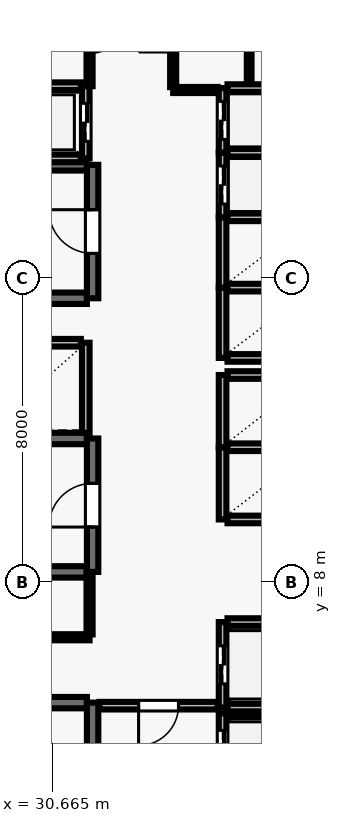
"""IFC4 building model, lengths in metres.
Left out: names, types, materials, properties, quantities, classifications, styles, units other than length and angle.
Written with IfcOpenShell. Run it as: python <this file> out.ifc"""

import sys

from ifc_helpers import new_model, si_unit, direction, frame, frame_2d, origin, place, context, subcontext, project, spatial, rectangle, extrude, element, fill, save


model = new_model("IFC4")
c1 = context("Model", 3, precision=1e-05, world=origin(), true_north=direction((0.0, 1.0)))
c2 = subcontext(c1, "Body", "Model", "MODEL_VIEW")
j1 = project(units=[si_unit("LENGTHUNIT", "METRE"), si_unit("PLANEANGLEUNIT", "RADIAN")], contexts=[c1])
p1 = place(None, origin())
s1 = spatial("IfcSite", under=j1, at=p1, CompositionType="ELEMENT")
p2 = place(p1, origin())
s2 = spatial("IfcBuilding", under=s1, at=p2, CompositionType="ELEMENT")
p3 = place(p2, frame((0.0, 0.0, 138.5)))
s3 = spatial("IfcBuildingStorey", under=s2, at=p3, CompositionType="ELEMENT", Elevation=138.5)
p4 = place(p3, frame((31.58, 4.83, 0.0), z_axis=(0.0, 0.0, 1.0), x_axis=(-1.0, 0.0, 0.0)))
e1 = element("IfcWall", 1, at=p4, inside=s3, PredefinedType="SHEAR", context=c2, shape_type="SweptSolid", body=[
    extrude(rectangle(XDim=8.36, YDim=0.3, at=frame_2d((4.18, 0.0))), origin(), (0.0, 0.0, 1.0), 3.69),
])
p5 = place(p3, frame((31.73, 0.96, 0.0), z_axis=(0.0, 0.0, 1.0), x_axis=(0.0, 1.0, 0.0)))
e2 = element("IfcWall", 2, at=p5, inside=s3, PredefinedType="SHEAR", context=c2, shape_type="SweptSolid", body=[
    extrude(rectangle(XDim=3.87, YDim=0.3, at=frame_2d((1.935, 0.0))), origin(), (0.0, 0.0, 1.0), 3.69),
])
p6 = place(p5, frame((1.54, 0.0, 0.0)))
e3 = element("IfcOpeningElement", 3, at=p6, cuts=e2, PredefinedType="OPENING", context=c2, shape_type="SweptSolid", body=[
    extrude(rectangle(XDim=1.15, YDim=2.15, at=frame_2d((0.575, 1.075))), frame((0.0, 0.16, 0.0), z_axis=(0.0, -1.0, 0.0), x_axis=(1.0, 0.0, 0.0)), (0.0, 0.0, 1.0), 0.32),
])
for number, where, z_axis, x_axis in (
    (4, (31.58, 18.98, 0.0), (0.0, 0.0, 1.0), (-1.0, 0.0, 0.0)),
    (5, (23.22, 15.47, 0.0), (0.0, 0.0, 1.0), (1.0, 0.0, 0.0)),
):
    element("IfcWall", number, at=place(p3, frame(where, z_axis=z_axis, x_axis=x_axis)), inside=s3, PredefinedType="SHEAR", context=c2, shape_type="SweptSolid", body=[
        extrude(rectangle(XDim=8.36, YDim=0.3, at=frame_2d((4.18, 0.0))), origin(), (0.0, 0.0, 1.0), 3.69),
    ])
p7 = place(p3, frame((31.73, 15.47, 0.0), z_axis=(0.0, 0.0, 1.0), x_axis=(0.0, 1.0, 0.0)))
e6 = element("IfcWall", 6, at=p7, inside=s3, PredefinedType="SHEAR", context=c2, shape_type="SweptSolid", body=[
    extrude(rectangle(XDim=3.51, YDim=0.3, at=frame_2d((1.755, 0.0))), origin(), (0.0, 0.0, 1.0), 3.69),
])
p8 = place(p7, frame((1.18, 0.0, 0.0)))
e7 = element("IfcOpeningElement", 7, at=p8, cuts=e6, PredefinedType="OPENING", context=c2, shape_type="SweptSolid", body=[
    extrude(rectangle(XDim=1.15, YDim=2.15, at=frame_2d((0.575, 1.075))), frame((0.0, 0.16, 0.0), z_axis=(0.0, -1.0, 0.0), x_axis=(1.0, 0.0, 0.0)), (0.0, 0.0, 1.0), 0.32),
])
for number, where, z_axis, x_axis in (
    (8, (31.58, 11.78, 0.0), (0.0, 0.0, 1.0), (-1.0, 0.0, 0.0)),
    (9, (23.22, 8.27, 0.0), (0.0, 0.0, 1.0), (1.0, 0.0, 0.0)),
):
    element("IfcWall", number, at=place(p3, frame(where, z_axis=z_axis, x_axis=x_axis)), inside=s3, PredefinedType="SHEAR", context=c2, shape_type="SweptSolid", body=[
        extrude(rectangle(XDim=8.36, YDim=0.3, at=frame_2d((4.18, 0.0))), origin(), (0.0, 0.0, 1.0), 3.69),
    ])
p9 = place(p3, frame((31.73, 8.27, 0.0), z_axis=(0.0, 0.0, 1.0), x_axis=(0.0, 1.0, 0.0)))
e10 = element("IfcWall", 10, at=p9, inside=s3, PredefinedType="SHEAR", context=c2, shape_type="SweptSolid", body=[
    extrude(rectangle(XDim=3.51, YDim=0.3, at=frame_2d((1.755, 0.0))), origin(), (0.0, 0.0, 1.0), 3.69),
])
p10 = place(p9, frame((1.18, 0.0, 0.0)))
e11 = element("IfcOpeningElement", 11, at=p10, cuts=e10, PredefinedType="OPENING", context=c2, shape_type="SweptSolid", body=[
    extrude(rectangle(XDim=1.15, YDim=2.15, at=frame_2d((0.575, 1.075))), frame((0.0, 0.16, 0.0), z_axis=(0.0, -1.0, 0.0), x_axis=(1.0, 0.0, 0.0)), (0.0, 0.0, 1.0), 0.32),
])
p11 = place(p3, frame((35.15, 4.55, 0.0), z_axis=(0.0, 0.0, 1.0), x_axis=(0.0, -1.0, 0.0)))
e12 = element("IfcWall", 12, at=p11, inside=s3, PredefinedType="SOLIDWALL", context=c2, shape_type="SweptSolid", body=[
    extrude(rectangle(XDim=2.1, YDim=0.2, at=frame_2d((1.05, 0.0))), origin(), (0.0, 0.0, 1.0), 3.69),
])
p12 = place(p11, frame((0.45, 0.0, 0.0)))
e13 = element("IfcOpeningElement", 13, at=p12, cuts=e12, PredefinedType="OPENING", context=c2, shape_type="SweptSolid", body=[
    extrude(rectangle(XDim=1.2, YDim=2.15, at=frame_2d((0.6, 1.075))), frame((0.0, 0.11, 0.0), z_axis=(0.0, -1.0, 0.0), x_axis=(1.0, 0.0, 0.0)), (0.0, 0.0, 1.0), 0.22),
])
p13 = place(p3, frame((37.42, 4.55, 0.0), z_axis=(0.0, 0.0, 1.0), x_axis=(-1.0, 0.0, 0.0)))
e14 = element("IfcWall", 14, at=p13, inside=s3, PredefinedType="SOLIDWALL", context=c2, shape_type="SweptSolid", body=[
    extrude(rectangle(XDim=2.14, YDim=0.2, at=frame_2d((1.07, 0.0))), origin(), (0.0, 0.0, 1.0), 3.69),
])
p14 = place(p3, frame((35.15, 6.95, 0.0), z_axis=(0.0, 0.0, 1.0), x_axis=(0.0, -1.0, 0.0)))
e15 = element("IfcWall", 15, at=p14, inside=s3, PredefinedType="SOLIDWALL", context=c2, shape_type="SweptSolid", body=[
    extrude(rectangle(XDim=2.25, YDim=0.2, at=frame_2d((1.125, 0.0))), origin(), (0.0, 0.0, 1.0), 3.69),
])
p15 = place(p14, frame((0.625, 0.0, 0.0)))
e16 = element("IfcOpeningElement", 16, at=p15, cuts=e15, PredefinedType="OPENING", context=c2, shape_type="SweptSolid", body=[
    extrude(rectangle(XDim=1.0, YDim=2.1, at=frame_2d((0.5, 1.05))), frame((0.0, 0.11, 0.0), z_axis=(0.0, -1.0, 0.0), x_axis=(1.0, 0.0, 0.0)), (0.0, 0.0, 1.0), 0.22),
])
for number, where, z_axis, x_axis in (
    (17, (35.28, 4.7, 0.0), (0.0, 0.0, 1.0), (1.0, 0.0, 0.0)),
    (18, (37.42, 6.95, 0.0), (0.0, 0.0, 1.0), (-1.0, 0.0, 0.0)),
):
    element("IfcWall", number, at=place(p3, frame(where, z_axis=z_axis, x_axis=x_axis)), inside=s3, PredefinedType="SOLIDWALL", context=c2, shape_type="SweptSolid", body=[
        extrude(rectangle(XDim=2.14, YDim=0.2, at=frame_2d((1.07, 0.0))), origin(), (0.0, 0.0, 1.0), 3.69),
    ])
p16 = place(p3, frame((35.15, 11.55, 0.0), z_axis=(0.0, 0.0, 1.0), x_axis=(0.0, -1.0, 0.0)))
e19 = element("IfcWall", 19, at=p16, inside=s3, PredefinedType="SOLIDWALL", context=c2, shape_type="SweptSolid", body=[
    extrude(rectangle(XDim=1.9, YDim=0.2, at=frame_2d((0.95, 0.0))), origin(), (0.0, 0.0, 1.0), 3.69),
])
for number, where, z_axis, x_axis in (
    (20, (35.28, 9.65, 0.0), (0.0, 0.0, 1.0), (1.0, 0.0, 0.0)),
    (21, (37.42, 11.55, 0.0), (0.0, 0.0, 1.0), (-1.0, 0.0, 0.0)),
):
    element("IfcWall", number, at=place(p3, frame(where, z_axis=z_axis, x_axis=x_axis)), inside=s3, PredefinedType="SOLIDWALL", context=c2, shape_type="SweptSolid", body=[
        extrude(rectangle(XDim=2.14, YDim=0.2, at=frame_2d((1.07, 0.0))), origin(), (0.0, 0.0, 1.0), 3.69),
    ])
p17 = place(p3, frame((35.15, 13.45, 0.0), z_axis=(0.0, 0.0, 1.0), x_axis=(0.0, -1.0, 0.0)))
e22 = element("IfcWall", 22, at=p17, inside=s3, PredefinedType="SOLIDWALL", context=c2, shape_type="SweptSolid", body=[
    extrude(rectangle(XDim=1.9, YDim=0.2, at=frame_2d((0.95, 0.0))), origin(), (0.0, 0.0, 1.0), 3.69),
])
p18 = place(p3, frame((37.42, 13.45, 0.0), z_axis=(0.0, 0.0, 1.0), x_axis=(-1.0, 0.0, 0.0)))
e23 = element("IfcWall", 23, at=p18, inside=s3, PredefinedType="SOLIDWALL", context=c2, shape_type="SweptSolid", body=[
    extrude(rectangle(XDim=2.14, YDim=0.2, at=frame_2d((1.07, 0.0))), origin(), (0.0, 0.0, 1.0), 3.69),
])
p19 = place(p3, frame((31.55, 11.93, 0.0), z_axis=(0.0, 0.0, 1.0), x_axis=(0.0, 1.0, 0.0)))
e24 = element("IfcWall", 24, at=p19, inside=s3, PredefinedType="SOLIDWALL", context=c2, shape_type="SweptSolid", body=[
    extrude(rectangle(XDim=2.37, YDim=0.2, at=frame_2d((1.185, 0.0))), origin(), (0.0, 0.0, 1.0), 3.69),
])
p20 = place(p3, frame((31.42, 14.3, 0.0), z_axis=(0.0, 0.0, 1.0), x_axis=(-1.0, 0.0, 0.0)))
e25 = element("IfcWall", 25, at=p20, inside=s3, PredefinedType="SOLIDWALL", context=c2, shape_type="SweptSolid", body=[
    extrude(rectangle(XDim=2.44, YDim=0.2, at=frame_2d((1.22, 0.0))), origin(), (0.0, 0.0, 1.0), 3.69),
])
p21 = place(p3, frame((35.15, 15.75, 0.0), z_axis=(0.0, 0.0, 1.0), x_axis=(0.0, -1.0, 0.0)))
e26 = element("IfcWall", 26, at=p21, inside=s3, PredefinedType="SOLIDWALL", context=c2, shape_type="SweptSolid", body=[
    extrude(rectangle(XDim=1.85, YDim=0.2, at=frame_2d((0.925, 0.0))), origin(), (0.0, 0.0, 1.0), 3.69),
])
for number, where, z_axis, x_axis in (
    (27, (35.28, 13.9, 0.0), (0.0, 0.0, 1.0), (1.0, 0.0, 0.0)),
    (28, (37.42, 15.75, 0.0), (0.0, 0.0, 1.0), (-1.0, 0.0, 0.0)),
):
    element("IfcWall", number, at=place(p3, frame(where, z_axis=z_axis, x_axis=x_axis)), inside=s3, PredefinedType="SOLIDWALL", context=c2, shape_type="SweptSolid", body=[
        extrude(rectangle(XDim=2.14, YDim=0.2, at=frame_2d((1.07, 0.0))), origin(), (0.0, 0.0, 1.0), 3.69),
    ])
p22 = place(p3, frame((35.15, 17.6, 0.0), z_axis=(0.0, 0.0, 1.0), x_axis=(0.0, -1.0, 0.0)))
e29 = element("IfcWall", 29, at=p22, inside=s3, PredefinedType="SOLIDWALL", context=c2, shape_type="SweptSolid", body=[
    extrude(rectangle(XDim=1.85, YDim=0.2, at=frame_2d((0.925, 0.0))), origin(), (0.0, 0.0, 1.0), 3.69),
])
p23 = place(p3, frame((37.42, 17.6, 0.0), z_axis=(0.0, 0.0, 1.0), x_axis=(-1.0, 0.0, 0.0)))
e30 = element("IfcWall", 30, at=p23, inside=s3, PredefinedType="SOLIDWALL", context=c2, shape_type="SweptSolid", body=[
    extrude(rectangle(XDim=2.14, YDim=0.2, at=frame_2d((1.07, 0.0))), origin(), (0.0, 0.0, 1.0), 3.69),
])
p24 = place(p3, frame((35.15, 19.3, 0.0), z_axis=(0.0, 0.0, 1.0), x_axis=(0.0, -1.0, 0.0)))
e31 = element("IfcWall", 31, at=p24, inside=s3, PredefinedType="SOLIDWALL", context=c2, shape_type="SweptSolid", body=[
    extrude(rectangle(XDim=1.7, YDim=0.2, at=frame_2d((0.85, 0.0))), origin(), (0.0, 0.0, 1.0), 3.69),
])
p25 = place(p24, frame((0.35, 0.0, 0.0)))
e32 = element("IfcOpeningElement", 32, at=p25, cuts=e31, PredefinedType="OPENING", context=c2, shape_type="SweptSolid", body=[
    extrude(rectangle(XDim=1.0, YDim=2.1, at=frame_2d((0.5, 1.05))), frame((0.0, 0.11, 0.0), z_axis=(0.0, -1.0, 0.0), x_axis=(1.0, 0.0, 0.0)), (0.0, 0.0, 1.0), 0.22),
])
p26 = place(p3, frame((37.42, 19.3, 0.0), z_axis=(0.0, 0.0, 1.0), x_axis=(-1.0, 0.0, 0.0)))
e33 = element("IfcWall", 33, at=p26, inside=s3, PredefinedType="SOLIDWALL", context=c2, shape_type="SweptSolid", body=[
    extrude(rectangle(XDim=2.14, YDim=0.2, at=frame_2d((1.07, 0.0))), origin(), (0.0, 0.0, 1.0), 3.69),
])
p27 = place(p3, frame((35.15, 21.0, 0.0), z_axis=(0.0, 0.0, 1.0), x_axis=(0.0, -1.0, 0.0)))
e34 = element("IfcWall", 34, at=p27, inside=s3, PredefinedType="SOLIDWALL", context=c2, shape_type="SweptSolid", body=[
    extrude(rectangle(XDim=1.7, YDim=0.2, at=frame_2d((0.85, 0.0))), origin(), (0.0, 0.0, 1.0), 3.69),
])
p28 = place(p27, frame((0.35, 0.0, 0.0)))
e35 = element("IfcOpeningElement", 35, at=p28, cuts=e34, PredefinedType="OPENING", context=c2, shape_type="SweptSolid", body=[
    extrude(rectangle(XDim=1.0, YDim=2.1, at=frame_2d((0.5, 1.05))), frame((0.0, 0.11, 0.0), z_axis=(0.0, -1.0, 0.0), x_axis=(1.0, 0.0, 0.0)), (0.0, 0.0, 1.0), 0.22),
])
p29 = place(p3, frame((37.42, 21.0, 0.0), z_axis=(0.0, 0.0, 1.0), x_axis=(-1.0, 0.0, 0.0)))
e36 = element("IfcWall", 36, at=p29, inside=s3, PredefinedType="SOLIDWALL", context=c2, shape_type="SweptSolid", body=[
    extrude(rectangle(XDim=2.14, YDim=0.2, at=frame_2d((1.07, 0.0))), origin(), (0.0, 0.0, 1.0), 3.69),
])
p30 = place(p3, frame((31.55, 19.15, 0.0), z_axis=(0.0, 0.0, 1.0), x_axis=(0.0, 1.0, 0.0)))
e37 = element("IfcWall", 37, at=p30, inside=s3, PredefinedType="SOLIDWALL", context=c2, shape_type="SweptSolid", body=[
    extrude(rectangle(XDim=1.9, YDim=0.2, at=frame_2d((0.95, 0.0))), origin(), (0.0, 0.0, 1.0), 3.69),
])
p31 = place(p30, frame((0.45, 0.0, 0.0)))
e38 = element("IfcOpeningElement", 38, at=p31, cuts=e37, PredefinedType="OPENING", context=c2, shape_type="SweptSolid", body=[
    extrude(rectangle(XDim=1.0, YDim=2.1, at=frame_2d((0.5, 1.05))), frame((0.0, 0.11, 0.0), z_axis=(0.0, -1.0, 0.0), x_axis=(1.0, 0.0, 0.0)), (0.0, 0.0, 1.0), 0.22),
])
for number, where, z_axis, x_axis in (
    (39, (28.98, 19.15, 0.0), (0.0, 0.0, 1.0), (1.0, 0.0, 0.0)),
    (40, (31.42, 21.05, 0.0), (0.0, 0.0, 1.0), (-1.0, 0.0, 0.0)),
):
    element("IfcWall", number, at=place(p3, frame(where, z_axis=z_axis, x_axis=x_axis)), inside=s3, PredefinedType="SOLIDWALL", context=c2, shape_type="SweptSolid", body=[
        extrude(rectangle(XDim=2.44, YDim=0.2, at=frame_2d((1.22, 0.0))), origin(), (0.0, 0.0, 1.0), 3.69),
    ])
p32 = place(p3, frame((31.65, 6.55, 0.0), z_axis=(0.0, 0.0, 1.0), x_axis=(-1.0, 0.0, 0.0)))
e41 = element("IfcWall", 41, at=p32, inside=s3, PredefinedType="PARTITIONING", context=c2, shape_type="SweptSolid", body=[
    extrude(rectangle(XDim=4.75, YDim=0.16, at=frame_2d((2.375, 0.0))), origin(), (0.0, 0.0, 1.0), 3.69),
])
p33 = place(p32, frame((1.935, 0.0, 0.0)))
e42 = element("IfcOpeningElement", 42, at=p33, cuts=e41, PredefinedType="OPENING", context=c2, shape_type="SweptSolid", body=[
    extrude(rectangle(XDim=0.88, YDim=2.1, at=frame_2d((0.44, 1.05))), frame((0.0, 0.09, 0.0), z_axis=(0.0, -1.0, 0.0), x_axis=(1.0, 0.0, 0.0)), (0.0, 0.0, 1.0), 0.18),
])
p34 = place(p3, frame((35.02, 4.75, 0.0), z_axis=(0.0, 0.0, 1.0), x_axis=(-1.0, 0.0, 0.0)))
e43 = element("IfcWall", 43, at=p34, inside=s3, PredefinedType="SOLIDWALL", context=c2, shape_type="SweptSolid", body=[
    extrude(rectangle(XDim=3.11, YDim=0.2, at=frame_2d((1.555, 0.0))), origin(), (0.0, 0.0, 1.0), 3.69),
])
p35 = place(p34, frame((1.03, 0.0, 0.0)))
e44 = element("IfcOpeningElement", 44, at=p35, cuts=e43, PredefinedType="OPENING", context=c2, shape_type="SweptSolid", body=[
    extrude(rectangle(XDim=1.05, YDim=2.15, at=frame_2d((0.525, 1.075))), frame((0.0, 0.11, 0.0), z_axis=(0.0, -1.0, 0.0), x_axis=(1.0, 0.0, 0.0)), (0.0, 0.0, 1.0), 0.22),
])
p36 = place(p3, frame((35.02, 20.95, 0.0), z_axis=(0.0, 0.0, 1.0), x_axis=(-1.0, 0.0, 0.0)))
e45 = element("IfcWall", 45, at=p36, inside=s3, PredefinedType="PARTITIONING", context=c2, shape_type="SweptSolid", body=[
    extrude(rectangle(XDim=1.17, YDim=0.16, at=frame_2d((0.585, 0.0))), origin(), (0.0, 0.0, 1.0), 3.69),
])
p37 = place(p3, frame((31.65, 8.24, 0.0), z_axis=(0.0, 0.0, 1.0), x_axis=(0.0, -1.0, 0.0)))
e46 = element("IfcWall", 46, at=p37, inside=s3, PredefinedType="PARTITIONING", context=c2, shape_type="SweptSolid", body=[
    extrude(rectangle(XDim=1.615, YDim=0.16, at=frame_2d((0.808, 0.0))), origin(), (0.0, 0.0, 1.0), 3.69),
])
p38 = place(p3, frame((31.65, 23.775, 0.0), z_axis=(0.0, 0.0, 1.0), x_axis=(0.0, -1.0, 0.0)))
e47 = element("IfcWall", 47, at=p38, inside=s3, PredefinedType="PARTITIONING", context=c2, shape_type="SweptSolid", body=[
    extrude(rectangle(XDim=2.725, YDim=0.16, at=frame_2d((1.362, 0.0))), origin(), (0.0, 0.0, 1.0), 3.69),
])
p39 = place(p38, frame((0.862, 0.0, 0.0)))
e48 = element("IfcOpeningElement", 48, at=p39, cuts=e47, PredefinedType="OPENING", context=c2, shape_type="SweptSolid", body=[
    extrude(rectangle(XDim=1.0, YDim=2.1, at=frame_2d((0.5, 1.05))), frame((0.0, 0.09, 0.0), z_axis=(0.0, -1.0, 0.0), x_axis=(1.0, 0.0, 0.0)), (0.0, 0.0, 1.0), 0.18),
])
p40 = place(p3, frame((33.85, 21.025, 0.0), z_axis=(0.0, 0.0, 1.0), x_axis=(0.0, 1.0, 0.0)))
e49 = element("IfcWall", 49, at=p40, inside=s3, PredefinedType="PARTITIONING", context=c2, shape_type="SweptSolid", body=[
    extrude(rectangle(XDim=2.75, YDim=0.16, at=frame_2d((1.375, 0.0))), origin(), (0.0, 0.0, 1.0), 3.69),
])
p41 = place(p40, frame((0.925, 0.0, 0.0)))
e50 = element("IfcOpeningElement", 50, at=p41, cuts=e49, PredefinedType="OPENING", context=c2, shape_type="SweptSolid", body=[
    extrude(rectangle(XDim=0.9, YDim=2.1, at=frame_2d((0.45, 1.05))), frame((0.0, 0.09, 0.0), z_axis=(0.0, -1.0, 0.0), x_axis=(1.0, 0.0, 0.0)), (0.0, 0.0, 1.0), 0.18),
])
p42 = place(p3, frame((35.85, 21.13, 0.0), z_axis=(0.0, 0.0, 1.0), x_axis=(0.0, 1.0, 0.0)))
e51 = element("IfcWall", 51, at=p42, inside=s3, PredefinedType="PARTITIONING", context=c2, shape_type="SweptSolid", body=[
    extrude(rectangle(XDim=2.645, YDim=0.125, at=frame_2d((1.323, 0.0))), origin(), (0.0, 0.0, 1.0), 3.69),
])
p43 = place(p42, frame((0.872, 0.0, 0.0)))
e52 = element("IfcOpeningElement", 52, at=p43, cuts=e51, PredefinedType="OPENING", context=c2, shape_type="SweptSolid", body=[
    extrude(rectangle(XDim=0.9, YDim=2.1, at=frame_2d((0.45, 1.05))), frame((0.0, 0.073, 0.0), z_axis=(0.0, -1.0, 0.0), x_axis=(1.0, 0.0, 0.0)), (0.0, 0.0, 1.0), 0.145),
])
p44 = place(p8, origin())
e53 = element("IfcDoor", 53, at=p44, inside=s3, OperationType="SINGLE_SWING_RIGHT", PredefinedType="DOOR", context=c2, shape_type="SweptSolid", body=[
    extrude(rectangle(XDim=1.15, YDim=2.15, at=frame_2d((0.575, 1.075))), frame((0.0, 0.025, 0.0), z_axis=(0.0, -1.0, 0.0), x_axis=(1.0, 0.0, 0.0)), (0.0, 0.0, 1.0), 0.05),
])
fill(e7, e53)
p45 = place(p10, origin())
e54 = element("IfcDoor", 54, at=p45, inside=s3, OperationType="SINGLE_SWING_LEFT", PredefinedType="DOOR", context=c2, shape_type="SweptSolid", body=[
    extrude(rectangle(XDim=1.15, YDim=2.15, at=frame_2d((0.575, 1.075))), frame((0.0, 0.025, 0.0), z_axis=(0.0, -1.0, 0.0), x_axis=(1.0, 0.0, 0.0)), (0.0, 0.0, 1.0), 0.05),
])
fill(e11, e54)
p46 = place(p12, origin())
e55 = element("IfcDoor", 55, at=p46, inside=s3, OperationType="DOUBLE_DOOR_SLIDING", PredefinedType="DOOR", context=c2, shape_type="SweptSolid", body=[
    extrude(rectangle(XDim=1.2, YDim=2.15, at=frame_2d((0.6, 1.075))), frame((0.0, 0.025, 0.0), z_axis=(0.0, -1.0, 0.0), x_axis=(1.0, 0.0, 0.0)), (0.0, 0.0, 1.0), 0.05),
])
fill(e13, e55)
p47 = place(p15, origin())
e56 = element("IfcDoor", 56, at=p47, inside=s3, OperationType="DOUBLE_DOOR_SLIDING", PredefinedType="DOOR", context=c2, shape_type="SweptSolid", body=[
    extrude(rectangle(XDim=1.0, YDim=2.1, at=frame_2d((0.5, 1.05))), frame((0.0, 0.025, 0.0), z_axis=(0.0, -1.0, 0.0), x_axis=(1.0, 0.0, 0.0)), (0.0, 0.0, 1.0), 0.05),
])
fill(e16, e56)
p48 = place(p25, origin())
e57 = element("IfcDoor", 57, at=p48, inside=s3, OperationType="DOUBLE_DOOR_SLIDING", PredefinedType="DOOR", context=c2, shape_type="SweptSolid", body=[
    extrude(rectangle(XDim=1.0, YDim=2.1, at=frame_2d((0.5, 1.05))), frame((0.0, 0.025, 0.0), z_axis=(0.0, -1.0, 0.0), x_axis=(1.0, 0.0, 0.0)), (0.0, 0.0, 1.0), 0.05),
])
fill(e32, e57)
p49 = place(p28, origin())
e58 = element("IfcDoor", 58, at=p49, inside=s3, OperationType="DOUBLE_DOOR_SLIDING", PredefinedType="DOOR", context=c2, shape_type="SweptSolid", body=[
    extrude(rectangle(XDim=1.0, YDim=2.1, at=frame_2d((0.5, 1.05))), frame((0.0, 0.025, 0.0), z_axis=(0.0, -1.0, 0.0), x_axis=(1.0, 0.0, 0.0)), (0.0, 0.0, 1.0), 0.05),
])
fill(e35, e58)
p50 = place(p31, origin())
e59 = element("IfcDoor", 59, at=p50, inside=s3, OperationType="DOUBLE_DOOR_SLIDING", PredefinedType="DOOR", context=c2, shape_type="SweptSolid", body=[
    extrude(rectangle(XDim=1.0, YDim=2.1, at=frame_2d((0.5, 1.05))), frame((0.0, 0.025, 0.0), z_axis=(0.0, -1.0, 0.0), x_axis=(1.0, 0.0, 0.0)), (0.0, 0.0, 1.0), 0.05),
])
fill(e38, e59)
p51 = place(p35, origin())
e60 = element("IfcDoor", 60, at=p51, inside=s3, OperationType="SINGLE_SWING_RIGHT", PredefinedType="DOOR", context=c2, shape_type="SweptSolid", body=[
    extrude(rectangle(XDim=1.05, YDim=2.15, at=frame_2d((0.525, 1.075))), frame((0.0, 0.025, 0.0), z_axis=(0.0, -1.0, 0.0), x_axis=(1.0, 0.0, 0.0)), (0.0, 0.0, 1.0), 0.05),
])
fill(e44, e60)
p52 = place(p39, origin())
e61 = element("IfcDoor", 61, at=p52, inside=s3, OperationType="SINGLE_SWING_LEFT", PredefinedType="DOOR", context=c2, shape_type="SweptSolid", body=[
    extrude(rectangle(XDim=1.0, YDim=2.1, at=frame_2d((0.5, 1.05))), frame((0.0, 0.025, 0.0), z_axis=(0.0, -1.0, 0.0), x_axis=(1.0, 0.0, 0.0)), (0.0, 0.0, 1.0), 0.05),
])
fill(e48, e61)
save(model, sys.argv[1])
